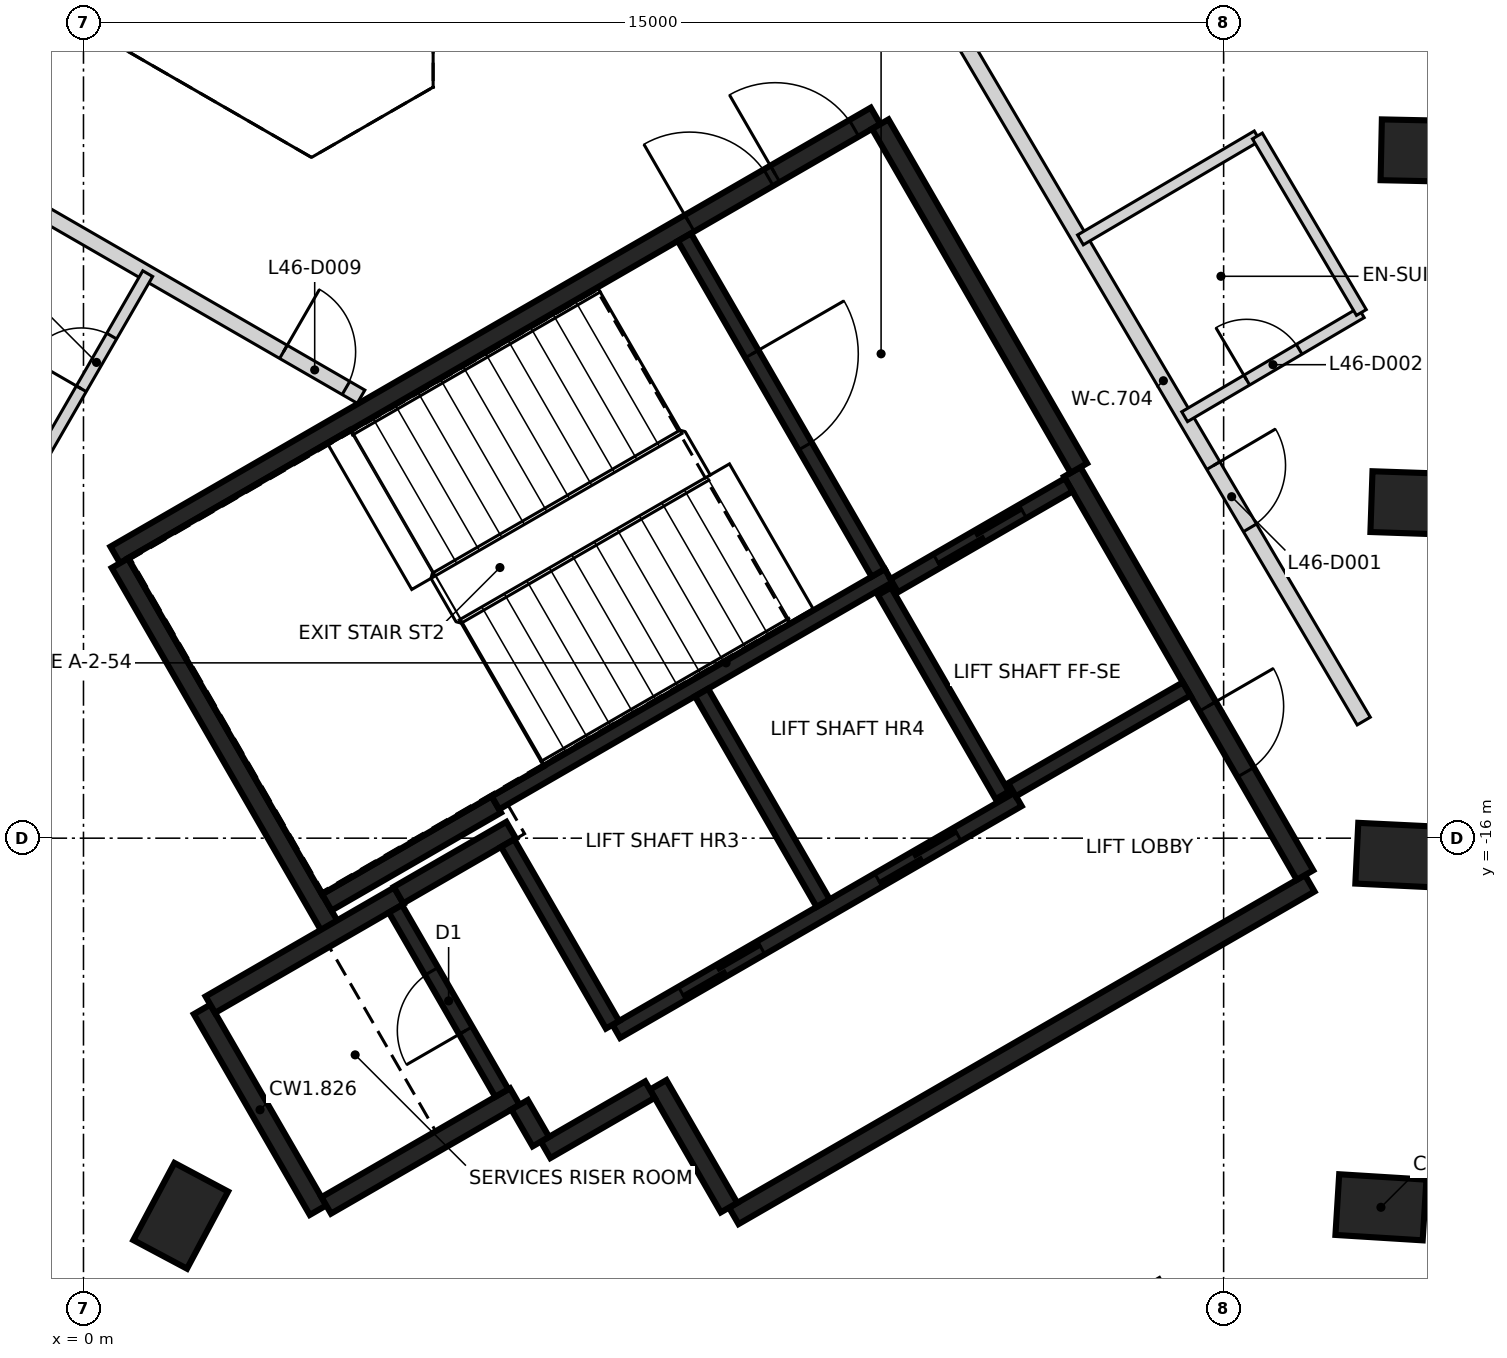
"""IFC4 building model, lengths in metres.
Left out: names, types, materials, properties, quantities, classifications, styles, units other than length and angle.
Written with IfcOpenShell. Run it as: python <this file> out.ifc"""

import sys

from ifc_helpers import new_model, si_unit, direction, frame, frame_2d, origin, origin_2d, place, context, subcontext, project, spatial, rectangle, extrude, element, fill, save


model = new_model("IFC4")
c1 = context("Model", 3, precision=1e-05, world=origin(), true_north=direction((0.0, 1.0)))
c2 = subcontext(c1, "Body", "Model", "MODEL_VIEW")
j1 = project(units=[si_unit("LENGTHUNIT", "METRE"), si_unit("PLANEANGLEUNIT", "RADIAN")], contexts=[c1])
p1 = place(None, origin())
s1 = spatial("IfcSite", under=j1, at=p1, CompositionType="ELEMENT")
p2 = place(p1, origin())
s2 = spatial("IfcBuilding", under=s1, at=p2, CompositionType="ELEMENT")
p3 = place(p2, frame((0.0, 0.0, 186.4)))
s3 = spatial("IfcBuildingStorey", under=s2, at=p3, CompositionType="ELEMENT", Elevation=186.4)
for number, where, z_axis, x_axis in (
    (1, (17.07, -20.856, -0.35), (0.0, 0.0, 1.0), (-0.998, 0.062, 0.0)),
    (2, (17.326, -16.226, -0.35), (0.0, 0.0, 1.0), (-0.999, 0.048, 0.0)),
    (3, (17.519, -11.592, -0.35), (0.0, 0.0, 1.0), (-0.999, 0.034, 0.0)),
    (4, (17.648, -6.956, -0.35), (0.0, 0.0, 1.0), (-1.0, 0.021, 0.0)),
    (5, (1.279, -20.968, -0.35), (0.0, 0.0, 1.0), (0.47, 0.883, 0.0)),
):
    element("IfcColumn", number, at=place(p3, frame(where, z_axis=z_axis, x_axis=x_axis)), inside=s3, PredefinedType="COLUMN", context=c2, shape_type="SweptSolid", body=[
        extrude(rectangle(XDim=1.15, YDim=0.8, at=origin_2d()), origin(), (0.0, 0.0, 1.0), 3.6),
    ])
p4 = place(p3, frame((0.417, -12.273, 0.0), z_axis=(0.0, 0.0, 1.0), x_axis=(0.866021906294, 0.500006057782, 0.0)))
e6 = element("IfcWall", 6, at=p4, inside=s3, PredefinedType="SHEAR", context=c2, shape_type="SweptSolid", body=[
    extrude(rectangle(XDim=11.55, YDim=0.25, at=frame_2d((5.775, 0.0))), origin(), (0.0, 0.0, 1.0), 3.25),
])
p5 = place(p4, frame((10.025, 0.0, 0.0)))
e7 = element("IfcOpeningElement", 7, at=p5, cuts=e6, PredefinedType="OPENING", context=c2, shape_type="SweptSolid", body=[
    extrude(rectangle(XDim=1.2, YDim=2.1, at=frame_2d((0.6, 1.05))), frame((0.0, 0.135, 0.0), z_axis=(0.0, -1.0, 0.0), x_axis=(1.0, 0.0, 0.0)), (0.0, 0.0, 1.0), 0.27),
])
p6 = place(p4, frame((8.725, 0.0, 0.0)))
e8 = element("IfcOpeningElement", 8, at=p6, cuts=e6, PredefinedType="OPENING", context=c2, shape_type="SweptSolid", body=[
    extrude(rectangle(XDim=1.2, YDim=2.1, at=frame_2d((0.6, 1.05))), frame((0.0, 0.135, 0.0), z_axis=(0.0, -1.0, 0.0), x_axis=(1.0, 0.0, 0.0)), (0.0, 0.0, 1.0), 0.27),
])
p7 = place(p3, frame((16.133, -16.594, 0.0), z_axis=(0.0, 0.0, 1.0), x_axis=(-0.866022959057, -0.500004234368, 0.0)))
e9 = element("IfcWall", 9, at=p7, inside=s3, PredefinedType="SHEAR", context=c2, shape_type="SweptSolid", body=[
    extrude(rectangle(XDim=8.75, YDim=0.25, at=frame_2d((4.375, 0.0))), origin(), (0.0, 0.0, 1.0), 3.25),
])
p8 = place(p3, frame((13.008, -11.181, 0.0), z_axis=(0.0, 0.0, 1.0), x_axis=(0.500001955336, -0.866024274868, 0.0)))
e10 = element("IfcWall", 10, at=p8, inside=s3, PredefinedType="SHEAR", context=c2, shape_type="SweptSolid", body=[
    extrude(rectangle(XDim=6.125, YDim=0.25, at=frame_2d((3.062, 0.0))), origin(), (0.0, 0.0, 1.0), 3.25),
])
p9 = place(p8, frame((3.563, 0.0, 0.0)))
e11 = element("IfcOpeningElement", 11, at=p9, cuts=e10, PredefinedType="OPENING", context=c2, shape_type="SweptSolid", body=[
    extrude(rectangle(XDim=1.0, YDim=2.1, at=frame_2d((0.5, 1.05))), frame((0.0, 0.135, 0.0), z_axis=(0.0, -1.0, 0.0), x_axis=(1.0, 0.0, 0.0)), (0.0, 0.0, 1.0), 0.27),
])
p10 = place(p3, frame((3.235, -17.153, 0.0), z_axis=(0.0, 0.0, 1.0), x_axis=(-0.500008851346, 0.866020293397, 0.0)))
e12 = element("IfcWall", 12, at=p10, inside=s3, PredefinedType="SHEAR", context=c2, shape_type="SweptSolid", body=[
    extrude(rectangle(XDim=5.51, YDim=0.25, at=frame_2d((2.755, 0.0))), origin(), (0.0, 0.0, 1.0), 3.25),
])
p11 = place(p3, frame((10.483, -6.606, 0.0), z_axis=(0.0, 0.0, 1.0), x_axis=(0.49999885962, -0.866026062182, 0.0)))
e13 = element("IfcWall", 13, at=p11, inside=s3, PredefinedType="SHEAR", context=c2, shape_type="SweptSolid", body=[
    extrude(rectangle(XDim=5.225, YDim=0.25, at=frame_2d((2.612, 0.0))), origin(), (0.0, 0.0, 1.0), 3.25),
])
p12 = place(p3, frame((3.085, -20.894, 0.0), z_axis=(0.0, 0.0, 1.0), x_axis=(-0.499978833458, 0.866037623948, 0.0)))
e14 = element("IfcWall", 14, at=p12, inside=s3, PredefinedType="SHEAR", context=c2, shape_type="SweptSolid", body=[
    extrude(rectangle(XDim=3.05, YDim=0.25, at=frame_2d((1.525, 0.0))), origin(), (0.0, 0.0, 1.0), 3.25),
])
p13 = place(p3, frame((1.669, -18.19, 0.0), z_axis=(0.0, 0.0, 1.0), x_axis=(0.866042235819, 0.499970844928, 0.0)))
e15 = element("IfcWall", 15, at=p13, inside=s3, PredefinedType="SHEAR", context=c2, shape_type="SweptSolid", body=[
    extrude(rectangle(XDim=2.865, YDim=0.25, at=frame_2d((1.432, 0.0))), origin(), (0.0, 0.0, 1.0), 3.25),
])
p14 = place(p3, frame((5.675, -19.399, 0.0), z_axis=(0.0, 0.0, 1.0), x_axis=(-0.866026637627, -0.499997862916, 0.0)))
e16 = element("IfcWall", 16, at=p14, inside=s3, PredefinedType="SHEAR", context=c2, shape_type="SweptSolid", body=[
    extrude(rectangle(XDim=2.865, YDim=0.25, at=frame_2d((1.432, 0.0))), origin(), (0.0, 0.0, 1.0), 3.25),
])
p15 = place(p3, frame((5.431, -15.556, 0.0), z_axis=(0.0, 0.0, 1.0), x_axis=(-0.866022940537, -0.500004266446, 0.0)))
e17 = element("IfcWall", 17, at=p15, inside=s3, PredefinedType="SHEAR", context=c2, shape_type="SweptSolid", body=[
    extrude(rectangle(XDim=2.575, YDim=0.25, at=frame_2d((1.287, 0.0))), origin(), (0.0, 0.0, 1.0), 3.25),
])
p16 = place(p3, frame((8.493, -20.86, 0.0), z_axis=(0.0, 0.0, 1.0), x_axis=(-0.500039802285, 0.866002422705, 0.0)))
e18 = element("IfcWall", 18, at=p16, inside=s3, PredefinedType="SHEAR", context=c2, shape_type="SweptSolid", body=[
    extrude(rectangle(XDim=1.865, YDim=0.25, at=frame_2d((0.932, 0.0))), origin(), (0.0, 0.0, 1.0), 3.25),
])
p17 = place(p3, frame((4.145, -16.749, 0.0), z_axis=(0.0, 0.0, 1.0), x_axis=(0.866038183914, 0.499977863513, 0.0)))
e19 = element("IfcWall", 19, at=p17, inside=s3, PredefinedType="SHEAR", context=c2, shape_type="SweptSolid", body=[
    extrude(rectangle(XDim=1.71, YDim=0.25, at=frame_2d((0.855, 0.0))), origin(), (0.0, 0.0, 1.0), 3.25),
])
p18 = place(p3, frame((7.452, -19.308, 0.0), z_axis=(0.0, 0.0, 1.0), x_axis=(-0.866044474677, -0.49996696679, 0.0)))
e20 = element("IfcWall", 20, at=p18, inside=s3, PredefinedType="SHEAR", context=c2, shape_type="SweptSolid", body=[
    extrude(rectangle(XDim=1.584, YDim=0.25, at=frame_2d((0.792, 0.0))), origin(), (0.0, 0.0, 1.0), 3.25),
])
p19 = place(p3, frame((6.017, -19.992, 0.0), z_axis=(0.0, 0.0, 1.0), x_axis=(-0.500364886717, 0.865814633822, 0.0)))
e21 = element("IfcWall", 21, at=p19, inside=s3, PredefinedType="SHEAR", context=c2, shape_type="SweptSolid", body=[
    extrude(rectangle(XDim=0.559, YDim=0.25, at=frame_2d((0.28, 0.0))), origin(), (0.0, 0.0, 1.0), 3.25),
])
p20 = place(p3, frame((5.419, -15.534, 0.0), z_axis=(0.0, 0.0, 1.0), x_axis=(0.866029065029, 0.499993658486, 0.0)))
e22 = element("IfcWall", 22, at=p20, inside=s3, PredefinedType="SHEAR", context=c2, shape_type="SweptSolid", body=[
    extrude(rectangle(XDim=5.974, YDim=0.2, at=frame_2d((2.987, 0.0))), origin(), (0.0, 0.0, 1.0), 3.25),
])
p21 = place(p3, frame((7.01, -18.542, 0.0), z_axis=(0.0, 0.0, 1.0), x_axis=(0.866030299012, 0.499991521122, 0.0)))
e23 = element("IfcWall", 23, at=p21, inside=s3, PredefinedType="SHEAR", context=c2, shape_type="SweptSolid", body=[
    extrude(rectangle(XDim=6.1, YDim=0.2, at=frame_2d((3.05, 0.0))), origin(), (0.0, 0.0, 1.0), 3.25),
])
p22 = place(p21, frame((1.0, 0.0, 0.0)))
e24 = element("IfcOpeningElement", 24, at=p22, cuts=e23, PredefinedType="OPENING", context=c2, shape_type="SweptSolid", body=[
    extrude(rectangle(XDim=1.2, YDim=2.1, at=frame_2d((0.6, 1.05))), frame((0.0, 0.11, 0.0), z_axis=(0.0, -1.0, 0.0), x_axis=(1.0, 0.0, 0.0)), (0.0, 0.0, 1.0), 0.22),
])
p23 = place(p21, frame((3.982, 0.0, 0.0)))
e25 = element("IfcOpeningElement", 25, at=p23, cuts=e23, PredefinedType="OPENING", context=c2, shape_type="SweptSolid", body=[
    extrude(rectangle(XDim=1.2, YDim=2.1, at=frame_2d((0.6, 1.05))), frame((0.0, 0.11, 0.0), z_axis=(0.0, -1.0, 0.0), x_axis=(1.0, 0.0, 0.0)), (0.0, 0.0, 1.0), 0.22),
])
p24 = place(p3, frame((7.906, -8.094, 0.0), z_axis=(0.0, 0.0, 1.0), x_axis=(0.500027839223, -0.866009330205, 0.0)))
e26 = element("IfcWall", 26, at=p24, inside=s3, PredefinedType="SHEAR", context=c2, shape_type="SweptSolid", body=[
    extrude(rectangle(XDim=5.098, YDim=0.2, at=frame_2d((2.549, 0.0))), origin(), (0.0, 0.0, 1.0), 3.25),
])
p25 = place(p24, frame((1.774, 0.0, 0.0)))
e27 = element("IfcOpeningElement", 27, at=p25, cuts=e26, PredefinedType="OPENING", context=c2, shape_type="SweptSolid", body=[
    extrude(rectangle(XDim=1.4, YDim=2.1, at=frame_2d((0.7, 1.05))), frame((0.0, 0.11, 0.0), z_axis=(0.0, -1.0, 0.0), x_axis=(1.0, 0.0, 0.0)), (0.0, 0.0, 1.0), 0.22),
])
p26 = place(p3, frame((8.132, -14.084, 0.0), z_axis=(0.0, 0.0, 1.0), x_axis=(0.499997778408, -0.866026686418, 0.0)))
e28 = element("IfcWall", 28, at=p26, inside=s3, PredefinedType="SHEAR", context=c2, shape_type="SweptSolid", body=[
    extrude(rectangle(XDim=3.198, YDim=0.2, at=frame_2d((1.599, 0.0))), origin(), (0.0, 0.0, 1.0), 3.25),
])
p27 = place(p3, frame((5.503, -19.352, 0.0), z_axis=(0.0, 0.0, 1.0), x_axis=(-0.499986818241, 0.866033014143, 0.0)))
e29 = element("IfcWall", 29, at=p27, inside=s3, PredefinedType="SHEAR", context=c2, shape_type="SweptSolid", body=[
    extrude(rectangle(XDim=2.798, YDim=0.2, at=frame_2d((1.399, 0.0))), origin(), (0.0, 0.0, 1.0), 3.25),
])
p28 = place(p27, frame((0.949, 0.0, 0.0)))
e30 = element("IfcOpeningElement", 30, at=p28, cuts=e29, PredefinedType="OPENING", context=c2, shape_type="SweptSolid", body=[
    extrude(rectangle(XDim=0.9, YDim=2.1, at=frame_2d((0.45, 1.05))), frame((0.0, 0.11, 0.0), z_axis=(0.0, -1.0, 0.0), x_axis=(1.0, 0.0, 0.0)), (0.0, 0.0, 1.0), 0.22),
])
p29 = place(p3, frame((6.96, -18.455, 0.0), z_axis=(0.0, 0.0, 1.0), x_axis=(-0.499926705758, 0.866067716099, 0.0)))
e31 = element("IfcWall", 31, at=p29, inside=s3, PredefinedType="SHEAR", context=c2, shape_type="SweptSolid", body=[
    extrude(rectangle(XDim=2.759, YDim=0.2, at=frame_2d((1.38, 0.0))), origin(), (0.0, 0.0, 1.0), 3.25),
])
p30 = place(p3, frame((12.088, -15.437, 0.0), z_axis=(0.0, 0.0, 1.0), x_axis=(-0.500026960575, 0.86600983753, 0.0)))
e32 = element("IfcWall", 32, at=p30, inside=s3, PredefinedType="SHEAR", context=c2, shape_type="SweptSolid", body=[
    extrude(rectangle(XDim=3.1, YDim=0.2, at=frame_2d((1.55, 0.0))), origin(), (0.0, 0.0, 1.0), 3.25),
])
p31 = place(p3, frame((10.666, -12.678, 0.0), z_axis=(0.0, 0.0, 1.0), x_axis=(0.866018407898, 0.500012117035, 0.0)))
e33 = element("IfcWall", 33, at=p31, inside=s3, PredefinedType="SHEAR", context=c2, shape_type="SweptSolid", body=[
    extrude(rectangle(XDim=2.651, YDim=0.2, at=frame_2d((1.325, 0.0))), origin(), (0.0, 0.0, 1.0), 3.25),
])
p32 = place(p31, frame((0.652, 0.0, 0.0)))
e34 = element("IfcOpeningElement", 34, at=p32, cuts=e33, PredefinedType="OPENING", context=c2, shape_type="SweptSolid", body=[
    extrude(rectangle(XDim=1.3, YDim=2.1, at=frame_2d((0.65, 1.05))), frame((0.0, 0.11, 0.0), z_axis=(0.0, -1.0, 0.0), x_axis=(1.0, 0.0, 0.0)), (0.0, 0.0, 1.0), 0.22),
])
p33 = place(p3, frame((14.512, -14.037, 0.0), z_axis=(0.0, 0.0, 1.0), x_axis=(-0.866018407898, -0.500012117035, 0.0)))
e35 = element("IfcWall", 35, at=p33, inside=s3, PredefinedType="SHEAR", context=c2, shape_type="SweptSolid", body=[
    extrude(rectangle(XDim=2.651, YDim=0.2, at=frame_2d((1.325, 0.0))), origin(), (0.0, 0.0, 1.0), 3.25),
])
p34 = place(p3, frame((-7.589, -3.702, 0.0), z_axis=(0.0, 0.0, 1.0), x_axis=(0.86602490244, -0.500000868353, 0.0)))
e36 = element("IfcWall", 36, at=p34, inside=s3, PredefinedType="PARTITIONING", context=c2, shape_type="SweptSolid", body=[
    extrude(rectangle(XDim=12.98, YDim=0.2, at=frame_2d((6.49, 0.0))), origin(), (0.0, 0.0, 1.0), 3.25),
])
p35 = place(p34, frame((11.8, 0.0, 0.0)))
e37 = element("IfcOpeningElement", 37, at=p35, cuts=e36, PredefinedType="OPENING", context=c2, shape_type="SweptSolid", body=[
    extrude(rectangle(XDim=0.95, YDim=2.1, at=frame_2d((0.475, 1.05))), frame((0.0, 0.11, 0.0), z_axis=(0.0, -1.0, 0.0), x_axis=(1.0, 0.0, 0.0)), (0.0, 0.0, 1.0), 0.22),
])
p36 = place(p3, frame((11.571, -5.505, 0.0), z_axis=(0.0, 0.0, 1.0), x_axis=(0.507402039651, -0.861709446483, 0.0)))
e38 = element("IfcWall", 38, at=p36, inside=s3, PredefinedType="PARTITIONING", context=c2, shape_type="SweptSolid", body=[
    extrude(rectangle(XDim=10.391, YDim=0.2, at=frame_2d((5.196, 0.0))), origin(), (0.0, 0.0, 1.0), 3.25),
])
p37 = place(p36, frame((6.491, 0.0, 0.0)))
e39 = element("IfcOpeningElement", 39, at=p37, cuts=e38, PredefinedType="OPENING", context=c2, shape_type="SweptSolid", body=[
    extrude(rectangle(XDim=0.95, YDim=2.1, at=frame_2d((0.475, 1.05))), frame((0.0, 0.11, 0.0), z_axis=(0.0, -1.0, 0.0), x_axis=(1.0, 0.0, 0.0)), (0.0, 0.0, 1.0), 0.22),
])
p38 = place(p3, frame((-0.502, -10.908, 0.0), z_axis=(0.0, 0.0, 1.0), x_axis=(0.499675408556, 0.866212725654, 0.0)))
e40 = element("IfcWall", 40, at=p38, inside=s3, PredefinedType="PARTITIONING", context=c2, shape_type="SweptSolid", body=[
    extrude(rectangle(XDim=2.696, YDim=0.15, at=frame_2d((1.348, 0.0))), origin(), (0.0, 0.0, 1.0), 3.25),
])
p39 = place(p38, frame((0.948, 0.0, 0.0)))
e41 = element("IfcOpeningElement", 41, at=p39, cuts=e40, PredefinedType="OPENING", context=c2, shape_type="SweptSolid", body=[
    extrude(rectangle(XDim=0.8, YDim=2.1, at=frame_2d((0.4, 1.05))), frame((0.0, 0.085, 0.0), z_axis=(0.0, -1.0, 0.0), x_axis=(1.0, 0.0, 0.0)), (0.0, 0.0, 1.0), 0.17),
])
p40 = place(p3, frame((13.116, -8.129, 0.0), z_axis=(0.0, 0.0, 1.0), x_axis=(0.861885352062, 0.507103184669, 0.0)))
e42 = element("IfcWall", 42, at=p40, inside=s3, PredefinedType="PARTITIONING", context=c2, shape_type="SweptSolid", body=[
    extrude(rectangle(XDim=2.698, YDim=0.15, at=frame_2d((1.349, 0.0))), origin(), (0.0, 0.0, 1.0), 3.25),
])
p41 = place(p3, frame((14.487, -10.455, 0.0), z_axis=(0.0, 0.0, 1.0), x_axis=(0.861752634979, 0.507328686461, 0.0)))
e43 = element("IfcWall", 43, at=p41, inside=s3, PredefinedType="PARTITIONING", context=c2, shape_type="SweptSolid", body=[
    extrude(rectangle(XDim=2.697, YDim=0.15, at=frame_2d((1.348, 0.0))), origin(), (0.0, 0.0, 1.0), 3.25),
])
p42 = place(p41, frame((0.948, 0.0, 0.0)))
e44 = element("IfcOpeningElement", 44, at=p42, cuts=e43, PredefinedType="OPENING", context=c2, shape_type="SweptSolid", body=[
    extrude(rectangle(XDim=0.8, YDim=2.1, at=frame_2d((0.4, 1.05))), frame((0.0, 0.085, 0.0), z_axis=(0.0, -1.0, 0.0), x_axis=(1.0, 0.0, 0.0)), (0.0, 0.0, 1.0), 0.17),
])
p43 = place(p3, frame((15.444, -6.762, 0.0), z_axis=(0.0, 0.0, 1.0), x_axis=(0.507578234334, -0.861605673165, 0.0)))
e45 = element("IfcWall", 45, at=p43, inside=s3, PredefinedType="PARTITIONING", context=c2, shape_type="SweptSolid", body=[
    extrude(rectangle(XDim=2.695, YDim=0.15, at=frame_2d((1.348, 0.0))), origin(), (0.0, 0.0, 1.0), 3.25),
])
p44 = place(p32, origin())
e46 = element("IfcDoor", 46, at=p44, inside=s3, OperationType="SLIDING_TO_RIGHT", PredefinedType="DOOR", context=c2, shape_type="SweptSolid", body=[
    extrude(rectangle(XDim=1.3, YDim=2.1, at=frame_2d((0.65, 1.05))), frame((0.0, 0.025, 0.0), z_axis=(0.0, -1.0, 0.0), x_axis=(1.0, 0.0, 0.0)), (0.0, 0.0, 1.0), 0.05),
])
fill(e34, e46)
p45 = place(p22, origin())
e47 = element("IfcDoor", 47, at=p45, inside=s3, OperationType="DOUBLE_DOOR_SLIDING", PredefinedType="DOOR", context=c2, shape_type="SweptSolid", body=[
    extrude(rectangle(XDim=1.2, YDim=2.1, at=frame_2d((0.6, 1.05))), frame((0.0, 0.025, 0.0), z_axis=(0.0, -1.0, 0.0), x_axis=(1.0, 0.0, 0.0)), (0.0, 0.0, 1.0), 0.05),
])
fill(e24, e47)
p46 = place(p23, origin())
e48 = element("IfcDoor", 48, at=p46, inside=s3, OperationType="DOUBLE_DOOR_SLIDING", PredefinedType="DOOR", context=c2, shape_type="SweptSolid", body=[
    extrude(rectangle(XDim=1.2, YDim=2.1, at=frame_2d((0.6, 1.05))), frame((0.0, 0.025, 0.0), z_axis=(0.0, -1.0, 0.0), x_axis=(1.0, 0.0, 0.0)), (0.0, 0.0, 1.0), 0.05),
])
fill(e25, e48)
p47 = place(p9, origin())
e49 = element("IfcDoor", 49, at=p47, inside=s3, OperationType="SINGLE_SWING_LEFT", PredefinedType="DOOR", context=c2, shape_type="SweptSolid", body=[
    extrude(rectangle(XDim=1.0, YDim=2.1, at=frame_2d((0.5, 1.05))), frame((0.0, 0.025, 0.0), z_axis=(0.0, -1.0, 0.0), x_axis=(1.0, 0.0, 0.0)), (0.0, 0.0, 1.0), 0.05),
])
fill(e11, e49)
p48 = place(p5, origin())
e50 = element("IfcDoor", 50, at=p48, inside=s3, OperationType="SINGLE_SWING_LEFT", PredefinedType="DOOR", context=c2, shape_type="SweptSolid", body=[
    extrude(rectangle(XDim=1.2, YDim=2.1, at=frame_2d((0.6, 1.05))), frame((0.0, 0.025, 0.0), z_axis=(0.0, -1.0, 0.0), x_axis=(1.0, 0.0, 0.0)), (0.0, 0.0, 1.0), 0.05),
])
fill(e7, e50)
p49 = place(p6, origin())
e51 = element("IfcDoor", 51, at=p49, inside=s3, OperationType="SINGLE_SWING_RIGHT", PredefinedType="DOOR", context=c2, shape_type="SweptSolid", body=[
    extrude(rectangle(XDim=1.2, YDim=2.1, at=frame_2d((0.6, 1.05))), frame((0.0, 0.025, 0.0), z_axis=(0.0, -1.0, 0.0), x_axis=(1.0, 0.0, 0.0)), (0.0, 0.0, 1.0), 0.05),
])
fill(e8, e51)
p50 = place(p25, origin())
e52 = element("IfcDoor", 52, at=p50, inside=s3, OperationType="SINGLE_SWING_RIGHT", PredefinedType="DOOR", context=c2, shape_type="SweptSolid", body=[
    extrude(rectangle(XDim=1.4, YDim=2.1, at=frame_2d((0.7, 1.05))), frame((0.0, 0.025, 0.0), z_axis=(0.0, -1.0, 0.0), x_axis=(1.0, 0.0, 0.0)), (0.0, 0.0, 1.0), 0.05),
])
fill(e27, e52)
p51 = place(p28, origin())
e53 = element("IfcDoor", 53, at=p51, inside=s3, OperationType="SINGLE_SWING_LEFT", PredefinedType="DOOR", context=c2, shape_type="SweptSolid", body=[
    extrude(rectangle(XDim=0.9, YDim=2.1, at=frame_2d((0.45, 1.05))), frame((0.0, 0.025, 0.0), z_axis=(0.0, -1.0, 0.0), x_axis=(1.0, 0.0, 0.0)), (0.0, 0.0, 1.0), 0.05),
])
fill(e30, e53)
p52 = place(p37, origin())
e54 = element("IfcDoor", 54, at=p52, inside=s3, OperationType="SINGLE_SWING_LEFT", PredefinedType="DOOR", context=c2, shape_type="SweptSolid", body=[
    extrude(rectangle(XDim=0.95, YDim=2.1, at=frame_2d((0.475, 1.05))), frame((0.0, 0.025, 0.0), z_axis=(0.0, -1.0, 0.0), x_axis=(1.0, 0.0, 0.0)), (0.0, 0.0, 1.0), 0.05),
])
fill(e39, e54)
p53 = place(p42, frame((0.8, 0.0, 0.0), z_axis=(0.0, 0.0, 1.0), x_axis=(-1.0, 0.0, 0.0)))
e55 = element("IfcDoor", 55, at=p53, inside=s3, OperationType="SINGLE_SWING_LEFT", PredefinedType="DOOR", context=c2, shape_type="SweptSolid", body=[
    extrude(rectangle(XDim=0.8, YDim=2.1, at=frame_2d((0.4, 1.05))), frame((0.0, 0.025, 0.0), z_axis=(0.0, -1.0, 0.0), x_axis=(1.0, 0.0, 0.0)), (0.0, 0.0, 1.0), 0.05),
])
fill(e44, e55)
p54 = place(p35, frame((0.95, 0.0, 0.0), z_axis=(0.0, 0.0, 1.0), x_axis=(-1.0, 0.0, 0.0)))
e56 = element("IfcDoor", 56, at=p54, inside=s3, OperationType="SINGLE_SWING_LEFT", PredefinedType="DOOR", context=c2, shape_type="SweptSolid", body=[
    extrude(rectangle(XDim=0.95, YDim=2.1, at=frame_2d((0.475, 1.05))), frame((0.0, 0.025, 0.0), z_axis=(0.0, -1.0, 0.0), x_axis=(1.0, 0.0, 0.0)), (0.0, 0.0, 1.0), 0.05),
])
fill(e37, e56)
p55 = place(p39, frame((0.8, 0.0, 0.0), z_axis=(0.0, 0.0, 1.0), x_axis=(-1.0, 0.0, 0.0)))
e57 = element("IfcDoor", 57, at=p55, inside=s3, OperationType="SINGLE_SWING_LEFT", PredefinedType="DOOR", context=c2, shape_type="SweptSolid", body=[
    extrude(rectangle(XDim=0.8, YDim=2.1, at=frame_2d((0.4, 1.05))), frame((0.0, 0.025, 0.0), z_axis=(0.0, -1.0, 0.0), x_axis=(1.0, 0.0, 0.0)), (0.0, 0.0, 1.0), 0.05),
])
fill(e41, e57)
save(model, sys.argv[1])
